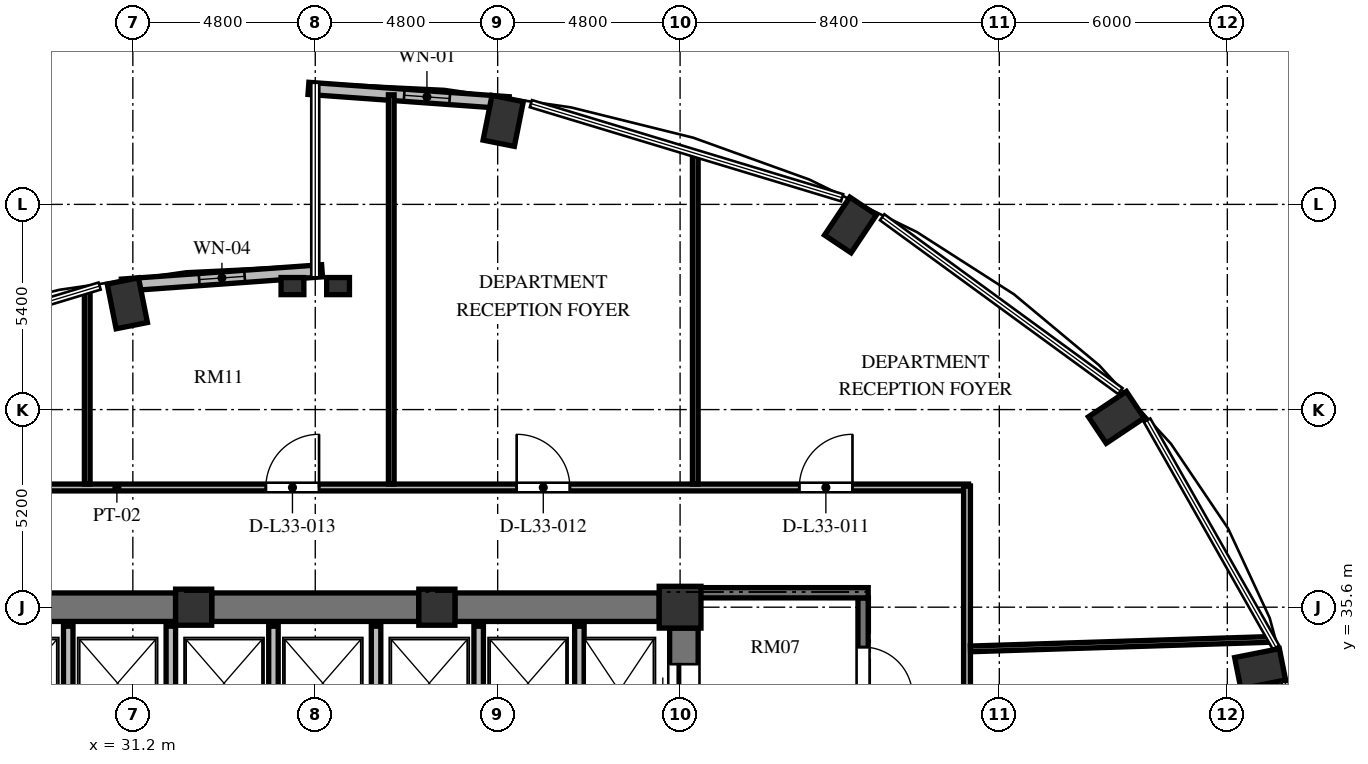
"""IFC4 building model, lengths in metres.
Left out: names, types, materials, properties, quantities, classifications, styles, units other than length and angle.
Written with IfcOpenShell. Run it as: python <this file> out.ifc"""

import sys

from ifc_helpers import new_model, si_unit, direction, frame, frame_2d, origin, origin_2d, place, context, subcontext, project, spatial, rectangle, extrude, element, fill, save


model = new_model("IFC4")
c1 = context("Model", 3, precision=1e-05, world=origin(), true_north=direction((0.0, 1.0)))
c2 = subcontext(c1, "Body", "Model", "MODEL_VIEW")
j1 = project(units=[si_unit("LENGTHUNIT", "METRE"), si_unit("PLANEANGLEUNIT", "RADIAN")], contexts=[c1])
p1 = place(None, origin())
s1 = spatial("IfcSite", under=j1, at=p1, CompositionType="ELEMENT")
p2 = place(p1, origin())
s2 = spatial("IfcBuilding", under=s1, at=p2, CompositionType="ELEMENT")
p3 = place(p2, frame((0.0, 0.0, 129.168)))
s3 = spatial("IfcBuildingStorey", under=s2, at=p3, CompositionType="ELEMENT", Elevation=129.168)
for number, where, z_axis, x_axis in (
    (1, (60.863, 33.98, 0.0), (0.0, 0.0, 1.0), (0.981, 0.195, 0.0)),
    (2, (57.078, 40.595, 0.0), (0.0, 0.0, 1.0), (0.831, 0.556, 0.0)),
    (3, (50.084, 45.657, 0.0), (0.0, 0.0, 1.0), (0.556, 0.831, 0.0)),
    (4, (40.946, 48.397, 0.0), (0.0, 0.0, 1.0), (0.195, 0.981, 0.0)),
    (5, (31.054, 43.597, 0.0), (0.0, 0.0, 1.0), (-0.195, 0.981, 0.0)),
):
    element("IfcColumn", number, at=place(p3, frame(where, z_axis=z_axis, x_axis=x_axis)), inside=s3, PredefinedType="COLUMN", context=c2, shape_type="SweptSolid", body=[
        extrude(rectangle(XDim=1.2, YDim=0.84, at=origin_2d()), origin(), (0.0, 0.0, 1.0), 3.648),
    ])
p4 = place(p3, frame((45.6, 35.6, 0.0), z_axis=(0.0, 0.0, 1.0), x_axis=(1.0, 0.0, 0.0)))
e6 = element("IfcColumn", 6, at=p4, inside=s3, PredefinedType="COLUMN", context=c2, shape_type="SweptSolid", body=[
    extrude(rectangle(XDim=1.1, YDim=1.1, at=origin_2d()), origin(), (0.0, 0.0, 1.0), 3.648),
])
for number, where, z_axis, x_axis in (
    (7, (39.2, 35.6, 0.0), (0.0, 0.0, 1.0), (1.0, 0.0, 0.0)),
    (8, (32.8, 35.6, 0.0), (0.0, 0.0, 1.0), (1.0, 0.0, 0.0)),
):
    element("IfcColumn", number, at=place(p3, frame(where, z_axis=z_axis, x_axis=x_axis)), inside=s3, PredefinedType="COLUMN", context=c2, shape_type="SweptSolid", body=[
        extrude(rectangle(XDim=0.95, YDim=0.95, at=origin_2d()), origin(), (0.0, 0.0, 1.0), 3.648),
    ])
for number, where, z_axis, x_axis in (
    (9, (35.4, 44.05, 0.0), (0.0, 0.0, 1.0), (1.0, 0.0, 0.0)),
    (10, (36.6, 44.05, 0.0), (0.0, 0.0, 1.0), (1.0, 0.0, 0.0)),
):
    element("IfcColumn", number, at=place(p3, frame(where, z_axis=z_axis, x_axis=x_axis)), inside=s3, PredefinedType="PILASTER", context=c2, shape_type="SweptSolid", body=[
        extrude(rectangle(XDim=0.6, YDim=0.45, at=origin_2d()), origin(), (0.0, 0.0, 1.0), 3.648),
    ])
p5 = place(p3, frame((45.7, 20.95, 0.0), z_axis=(0.0, 0.0, 1.0), x_axis=(0.0, 1.0, 0.0)))
e11 = element("IfcWall", 11, at=p5, inside=s3, PredefinedType="SHEAR", context=c2, shape_type="SweptSolid", body=[
    extrude(rectangle(XDim=14.1, YDim=0.75, at=frame_2d((7.05, 0.0))), origin(), (0.0, 0.0, 1.0), 3.648),
])
p6 = place(p5, frame((11.75, 0.0, 0.0)))
e12 = element("IfcOpeningElement", 12, at=p6, cuts=e11, PredefinedType="OPENING", context=c2, shape_type="SweptSolid", body=[
    extrude(rectangle(XDim=1.4, YDim=2.3, at=frame_2d((0.7, 1.15))), frame((0.0, 0.385, 0.0), z_axis=(0.0, -1.0, 0.0), x_axis=(1.0, 0.0, 0.0)), (0.0, 0.0, 1.0), 0.77),
])
p7 = place(p5, frame((0.95, 0.0, 0.0)))
e13 = element("IfcOpeningElement", 13, at=p7, cuts=e11, PredefinedType="OPENING", context=c2, shape_type="SweptSolid", body=[
    extrude(rectangle(XDim=1.4, YDim=2.3, at=frame_2d((0.7, 1.15))), frame((0.0, 0.385, 0.0), z_axis=(0.0, -1.0, 0.0), x_axis=(1.0, 0.0, 0.0)), (0.0, 0.0, 1.0), 0.77),
])
p8 = place(p3, frame((26.95, 35.6, 0.0), z_axis=(0.0, 0.0, 1.0), x_axis=(1.0, 0.0, 0.0)))
e14 = element("IfcWall", 14, at=p8, inside=s3, PredefinedType="SHEAR", context=c2, shape_type="SweptSolid", body=[
    extrude(rectangle(XDim=5.375, YDim=0.75, at=frame_2d((2.688, 0.0))), origin(), (0.0, 0.0, 1.0), 3.648),
])
p9 = place(p3, frame((33.275, 35.6, 0.0), z_axis=(0.0, 0.0, 1.0), x_axis=(1.0, 0.0, 0.0)))
e15 = element("IfcWall", 15, at=p9, inside=s3, PredefinedType="SHEAR", context=c2, shape_type="SweptSolid", body=[
    extrude(rectangle(XDim=5.45, YDim=0.75, at=frame_2d((2.725, 0.0))), origin(), (0.0, 0.0, 1.0), 3.648),
])
p10 = place(p3, frame((39.675, 35.6, 0.0), z_axis=(0.0, 0.0, 1.0), x_axis=(1.0, 0.0, 0.0)))
e16 = element("IfcWall", 16, at=p10, inside=s3, PredefinedType="SHEAR", context=c2, shape_type="SweptSolid", body=[
    extrude(rectangle(XDim=5.375, YDim=0.75, at=frame_2d((2.688, 0.0))), origin(), (0.0, 0.0, 1.0), 3.648),
])
p11 = place(p3, frame((41.091, 48.875, 0.0), z_axis=(0.0, 0.0, 1.0), x_axis=(-0.997432364291, 0.071614793619, 0.0)))
e17 = element("IfcWall", 17, at=p11, inside=s3, PredefinedType="SOLIDWALL", context=c2, shape_type="SweptSolid", body=[
    extrude(rectangle(XDim=5.284, YDim=0.32, at=frame_2d((2.642, 0.0))), origin(), (0.0, 0.0, 1.0), 3.198),
])
p12 = place(p11, frame((1.558, 0.0, 0.85)))
e18 = element("IfcOpeningElement", 18, at=p12, cuts=e17, PredefinedType="OPENING", context=c2, shape_type="SweptSolid", body=[
    extrude(rectangle(XDim=1.2, YDim=2.2, at=frame_2d((0.6, 1.1))), frame((0.0, 0.17, 0.0), z_axis=(0.0, -1.0, 0.0), x_axis=(1.0, 0.0, 0.0)), (0.0, 0.0, 1.0), 0.34),
])
p13 = place(p3, frame((36.179, 44.453, 0.0), z_axis=(0.0, 0.0, 1.0), x_axis=(-0.997431890304, -0.071621394884, 0.0)))
e19 = element("IfcWall", 19, at=p13, inside=s3, PredefinedType="SOLIDWALL", context=c2, shape_type="SweptSolid", body=[
    extrude(rectangle(XDim=5.284, YDim=0.32, at=frame_2d((2.642, 0.0))), origin(), (0.0, 0.0, 1.0), 3.198),
])
p14 = place(p13, frame((2.042, 0.0, 0.85)))
e20 = element("IfcOpeningElement", 20, at=p14, cuts=e19, PredefinedType="OPENING", context=c2, shape_type="SweptSolid", body=[
    extrude(rectangle(XDim=1.2, YDim=1.8, at=frame_2d((0.6, 0.9))), frame((0.0, 0.17, 0.0), z_axis=(0.0, -1.0, 0.0), x_axis=(1.0, 0.0, 0.0)), (0.0, 0.0, 1.0), 0.34),
])
p15 = place(p3, frame((42.95, 31.92, 0.0), z_axis=(0.0, 0.0, 1.0), x_axis=(0.0, 1.0, 0.0)))
e21 = element("IfcWall", 21, at=p15, inside=s3, PredefinedType="SOLIDWALL", context=c2, shape_type="SweptSolid", body=[
    extrude(rectangle(XDim=3.18, YDim=0.25, at=frame_2d((1.59, 0.0))), origin(), (0.0, 0.0, 1.0), 3.198),
])
for number, where, z_axis, x_axis in (
    (22, (29.5, 32.42, 0.0), (0.0, 0.0, 1.0), (0.0, 1.0, 0.0)),
    (23, (32.2, 32.42, 0.0), (0.0, 0.0, 1.0), (0.0, 1.0, 0.0)),
    (24, (34.9, 32.42, 0.0), (0.0, 0.0, 1.0), (0.0, 1.0, 0.0)),
    (25, (37.6, 32.42, 0.0), (0.0, 0.0, 1.0), (0.0, 1.0, 0.0)),
    (26, (40.3, 32.42, 0.0), (0.0, 0.0, 1.0), (0.0, 1.0, 0.0)),
):
    element("IfcWall", number, at=place(p3, frame(where, z_axis=z_axis, x_axis=x_axis)), inside=s3, PredefinedType="SOLIDWALL", context=c2, shape_type="SweptSolid", body=[
        extrude(rectangle(XDim=2.68, YDim=0.25, at=frame_2d((1.34, 0.0))), origin(), (0.0, 0.0, 1.0), 3.198),
    ])
p16 = place(p3, frame((50.415, 35.845, 0.0), z_axis=(0.0, 0.0, 1.0), x_axis=(0.0, -1.0, 0.0)))
e27 = element("IfcWall", 27, at=p16, inside=s3, PredefinedType="SHEAR", context=c2, shape_type="SweptSolid", body=[
    extrude(rectangle(XDim=15.825, YDim=0.27, at=frame_2d((7.913, 0.0))), origin(), (0.0, 0.0, 1.0), 3.648),
])
p17 = place(p16, frame((4.445, 0.0, 0.0)))
e28 = element("IfcOpeningElement", 28, at=p17, cuts=e27, PredefinedType="OPENING", context=c2, shape_type="SweptSolid", body=[
    extrude(rectangle(XDim=1.2, YDim=2.15, at=frame_2d((0.6, 1.075))), frame((0.0, 0.145, 0.0), z_axis=(0.0, -1.0, 0.0), x_axis=(1.0, 0.0, 0.0)), (0.0, 0.0, 1.0), 0.29),
])
p18 = place(p16, frame((1.295, 0.0, 0.0)))
e29 = element("IfcOpeningElement", 29, at=p18, cuts=e27, PredefinedType="OPENING", context=c2, shape_type="SweptSolid", body=[
    extrude(rectangle(XDim=1.3, YDim=2.2, at=frame_2d((0.65, 1.1))), frame((0.0, 0.145, 0.0), z_axis=(0.0, -1.0, 0.0), x_axis=(1.0, 0.0, 0.0)), (0.0, 0.0, 1.0), 0.29),
])
p19 = place(p16, frame((13.095, 0.0, 0.0)))
e30 = element("IfcOpeningElement", 30, at=p19, cuts=e27, PredefinedType="OPENING", context=c2, shape_type="SweptSolid", body=[
    extrude(rectangle(XDim=1.3, YDim=2.2, at=frame_2d((0.65, 1.1))), frame((0.0, 0.145, 0.0), z_axis=(0.0, -1.0, 0.0), x_axis=(1.0, 0.0, 0.0)), (0.0, 0.0, 1.0), 0.29),
])
p20 = place(p3, frame((46.075, 35.98, 0.0), z_axis=(0.0, 0.0, 1.0), x_axis=(1.0, 0.0, 0.0)))
e31 = element("IfcWall", 31, at=p20, inside=s3, PredefinedType="SHEAR", context=c2, shape_type="SweptSolid", body=[
    extrude(rectangle(XDim=4.475, YDim=0.27, at=frame_2d((2.238, 0.0))), origin(), (0.0, 0.0, 1.0), 3.648),
])
p21 = place(p3, frame((23.31, 38.75, 0.0), z_axis=(0.0, 0.0, 1.0), x_axis=(1.0, 0.0, 0.0)))
e32 = element("IfcWall", 32, at=p21, inside=s3, PredefinedType="PARTITIONING", context=c2, shape_type="SweptSolid", body=[
    extrude(rectangle(XDim=29.88, YDim=0.18, at=frame_2d((14.94, 0.0))), origin(), (0.0, 0.0, 1.0), 2.823),
])
p22 = place(p21, frame((25.426, 0.0, 0.0)))
e33 = element("IfcOpeningElement", 33, at=p22, cuts=e32, PredefinedType="OPENING", context=c2, shape_type="SweptSolid", body=[
    extrude(rectangle(XDim=1.4, YDim=2.2, at=frame_2d((0.7, 1.1))), frame((0.0, 0.1, 0.0), z_axis=(0.0, -1.0, 0.0), x_axis=(1.0, 0.0, 0.0)), (0.0, 0.0, 1.0), 0.2),
])
p23 = place(p21, frame((17.99, 0.0, 0.0)))
e34 = element("IfcOpeningElement", 34, at=p23, cuts=e32, PredefinedType="OPENING", context=c2, shape_type="SweptSolid", body=[
    extrude(rectangle(XDim=1.4, YDim=2.2, at=frame_2d((0.7, 1.1))), frame((0.0, 0.1, 0.0), z_axis=(0.0, -1.0, 0.0), x_axis=(1.0, 0.0, 0.0)), (0.0, 0.0, 1.0), 0.2),
])
p24 = place(p21, frame((11.39, 0.0, 0.0)))
e35 = element("IfcOpeningElement", 35, at=p24, cuts=e32, PredefinedType="OPENING", context=c2, shape_type="SweptSolid", body=[
    extrude(rectangle(XDim=1.4, YDim=2.2, at=frame_2d((0.7, 1.1))), frame((0.0, 0.1, 0.0), z_axis=(0.0, -1.0, 0.0), x_axis=(1.0, 0.0, 0.0)), (0.0, 0.0, 1.0), 0.2),
])
p25 = place(p21, frame((2.804, 0.0, 0.0)))
e36 = element("IfcOpeningElement", 36, at=p25, cuts=e32, PredefinedType="OPENING", context=c2, shape_type="SweptSolid", body=[
    extrude(rectangle(XDim=1.4, YDim=2.2, at=frame_2d((0.7, 1.1))), frame((0.0, 0.1, 0.0), z_axis=(0.0, -1.0, 0.0), x_axis=(1.0, 0.0, 0.0)), (0.0, 0.0, 1.0), 0.2),
])
p26 = place(p3, frame((53.15, 38.79, 0.0), z_axis=(0.0, 0.0, 1.0), x_axis=(0.0, -1.0, 0.0)))
e37 = element("IfcWall", 37, at=p26, inside=s3, PredefinedType="PARTITIONING", context=c2, shape_type="SweptSolid", body=[
    extrude(rectangle(XDim=9.43, YDim=0.18, at=frame_2d((4.715, 0.0))), origin(), (0.0, 0.0, 1.0), 3.198),
])
p27 = place(p3, frame((53.24, 34.502, 0.0), z_axis=(0.0, 0.0, 1.0), x_axis=(0.999499445349, 0.031636351679, 0.0)))
e38 = element("IfcWall", 38, at=p27, inside=s3, PredefinedType="PARTITIONING", context=c2, shape_type="SweptSolid", body=[
    extrude(rectangle(XDim=7.933, YDim=0.15, at=frame_2d((3.967, 0.0))), origin(), (0.0, 0.0, 1.0), 2.583),
])
p28 = place(p3, frame((30.0, 38.84, 0.0), z_axis=(0.0, 0.0, 1.0), x_axis=(0.0, 1.0, 0.0)))
e39 = element("IfcWall", 39, at=p28, inside=s3, PredefinedType="PARTITIONING", context=c2, shape_type="SweptSolid", body=[
    extrude(rectangle(XDim=5.098, YDim=0.15, at=frame_2d((2.549, 0.0))), origin(), (0.0, 0.0, 1.0), 3.198),
])
p29 = place(p3, frame((38.0, 38.84, 0.0), z_axis=(0.0, 0.0, 1.0), x_axis=(0.0, 1.0, 0.0)))
e40 = element("IfcWall", 40, at=p29, inside=s3, PredefinedType="PARTITIONING", context=c2, shape_type="SweptSolid", body=[
    extrude(rectangle(XDim=10.244, YDim=0.15, at=frame_2d((5.122, 0.0))), origin(), (0.0, 0.0, 1.0), 3.198),
])
p30 = place(p3, frame((46.0, 38.84, 0.0), z_axis=(0.0, 0.0, 1.0), x_axis=(0.0, 1.0, 0.0)))
e41 = element("IfcWall", 41, at=p30, inside=s3, PredefinedType="PARTITIONING", context=c2, shape_type="SweptSolid", body=[
    extrude(rectangle(XDim=8.689, YDim=0.15, at=frame_2d((4.345, 0.0))), origin(), (0.0, 0.0, 1.0), 3.198),
])
p31 = place(p12, origin())
e42 = element("IfcWindow", 42, at=p31, inside=s3, PartitioningType="SINGLE_PANEL", PredefinedType="WINDOW", context=c2, shape_type="SweptSolid", body=[
    extrude(rectangle(XDim=1.2, YDim=2.2, at=frame_2d((0.6, 1.1))), frame((0.0, 0.03, 0.0), z_axis=(0.0, -1.0, 0.0), x_axis=(1.0, 0.0, 0.0)), (0.0, 0.0, 1.0), 0.06),
])
fill(e18, e42)
p32 = place(p14, origin())
e43 = element("IfcWindow", 43, at=p32, inside=s3, PartitioningType="SINGLE_PANEL", PredefinedType="WINDOW", context=c2, shape_type="SweptSolid", body=[
    extrude(rectangle(XDim=1.2, YDim=1.8, at=frame_2d((0.6, 0.9))), frame((0.0, 0.03, 0.0), z_axis=(0.0, -1.0, 0.0), x_axis=(1.0, 0.0, 0.0)), (0.0, 0.0, 1.0), 0.06),
])
fill(e20, e43)
p33 = place(p6, origin())
e44 = element("IfcDoor", 44, at=p33, inside=s3, OperationType="SLIDING_TO_LEFT", PredefinedType="DOOR", context=c2, shape_type="SweptSolid", body=[
    extrude(rectangle(XDim=1.4, YDim=2.3, at=frame_2d((0.7, 1.15))), frame((0.0, 0.025, 0.0), z_axis=(0.0, -1.0, 0.0), x_axis=(1.0, 0.0, 0.0)), (0.0, 0.0, 1.0), 0.05),
])
fill(e12, e44)
p34 = place(p18, origin())
e45 = element("IfcDoor", 45, at=p34, inside=s3, OperationType="SINGLE_SWING_RIGHT", PredefinedType="DOOR", context=c2, shape_type="SweptSolid", body=[
    extrude(rectangle(XDim=1.3, YDim=2.2, at=frame_2d((0.65, 1.1))), frame((0.0, 0.025, 0.0), z_axis=(0.0, -1.0, 0.0), x_axis=(1.0, 0.0, 0.0)), (0.0, 0.0, 1.0), 0.05),
])
fill(e29, e45)
p35 = place(p22, origin())
e46 = element("IfcDoor", 46, at=p35, inside=s3, OperationType="SINGLE_SWING_RIGHT", PredefinedType="DOOR", context=c2, shape_type="SweptSolid", body=[
    extrude(rectangle(XDim=1.4, YDim=2.2, at=frame_2d((0.7, 1.1))), frame((0.0, 0.025, 0.0), z_axis=(0.0, -1.0, 0.0), x_axis=(1.0, 0.0, 0.0)), (0.0, 0.0, 1.0), 0.05),
])
fill(e33, e46)
p36 = place(p23, origin())
e47 = element("IfcDoor", 47, at=p36, inside=s3, OperationType="SINGLE_SWING_LEFT", PredefinedType="DOOR", context=c2, shape_type="SweptSolid", body=[
    extrude(rectangle(XDim=1.4, YDim=2.2, at=frame_2d((0.7, 1.1))), frame((0.0, 0.025, 0.0), z_axis=(0.0, -1.0, 0.0), x_axis=(1.0, 0.0, 0.0)), (0.0, 0.0, 1.0), 0.05),
])
fill(e34, e47)
p37 = place(p24, origin())
e48 = element("IfcDoor", 48, at=p37, inside=s3, OperationType="SINGLE_SWING_RIGHT", PredefinedType="DOOR", context=c2, shape_type="SweptSolid", body=[
    extrude(rectangle(XDim=1.4, YDim=2.2, at=frame_2d((0.7, 1.1))), frame((0.0, 0.025, 0.0), z_axis=(0.0, -1.0, 0.0), x_axis=(1.0, 0.0, 0.0)), (0.0, 0.0, 1.0), 0.05),
])
fill(e35, e48)
save(model, sys.argv[1])
